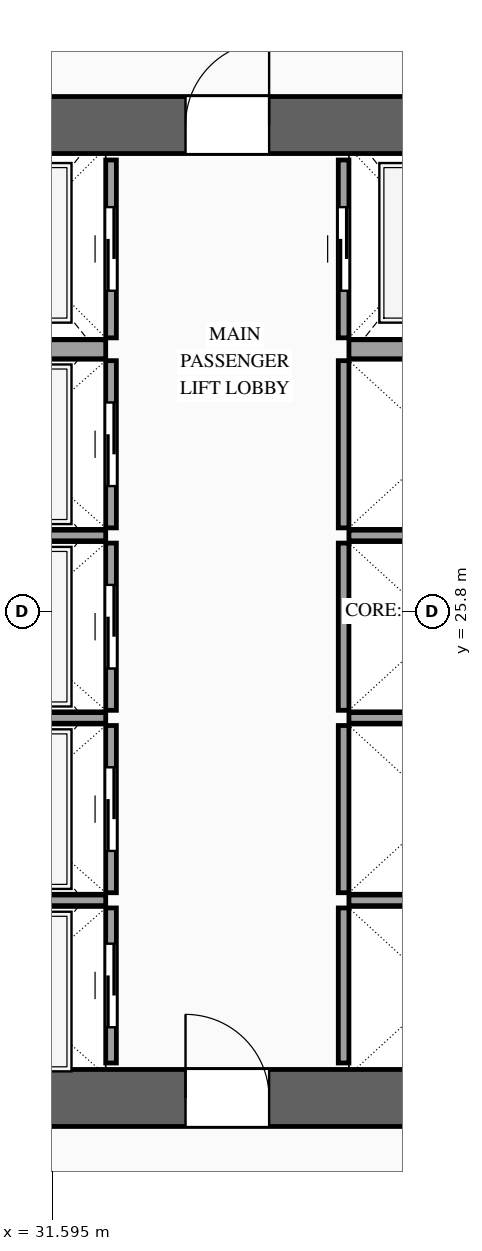
"""IFC4 building model, lengths in metres.
Left out: names, types, materials, properties, quantities, classifications, styles, units other than length and angle.
Written with IfcOpenShell. Run it as: python <this file> out.ifc"""

import sys

from ifc_helpers import new_model, si_unit, direction, frame, frame_2d, origin, place, context, subcontext, project, spatial, rectangle, extrude, source, transform, mapped, element, fill, save


model = new_model("IFC4")
c1 = context("Model", 3, precision=1e-05, world=origin(), true_north=direction((0.0, 1.0)))
c2 = subcontext(c1, "Body", "Model", "MODEL_VIEW")
j1 = project(units=[si_unit("LENGTHUNIT", "METRE"), si_unit("PLANEANGLEUNIT", "RADIAN")], contexts=[c1])
p1 = place(None, origin())
s1 = spatial("IfcSite", under=j1, at=p1, CompositionType="ELEMENT")
p2 = place(p1, origin())
s2 = spatial("IfcBuilding", under=s1, at=p2, CompositionType="ELEMENT")
p3 = place(p2, frame((0.0, 0.0, 148.8)))
s3 = spatial("IfcBuildingStorey", under=s2, at=p3, CompositionType="ELEMENT", Elevation=148.8)
p4 = place(p3, frame((23.425, 19.4, 0.0), z_axis=(0.0, 0.0, 1.0), x_axis=(1.0, 0.0, 0.0)))
e1 = element("IfcWall", 1, at=p4, inside=s3, PredefinedType="SHEAR", context=c2, shape_type="SweptSolid", body=[
    extrude(rectangle(XDim=27.15, YDim=0.75, at=frame_2d((13.575, 0.0))), origin(), (0.0, 0.0, 1.0), 3.6),
])
p5 = place(p4, frame((2.025, 0.0, 0.0)))
e2 = element("IfcOpeningElement", 2, at=p5, cuts=e1, PredefinedType="OPENING", context=c2, shape_type="SweptSolid", body=[
    extrude(rectangle(XDim=1.1, YDim=2.2, at=frame_2d((0.55, 1.1))), frame((0.0, 0.39, 0.0), z_axis=(0.0, -1.0, 0.0), x_axis=(1.0, 0.0, 0.0)), (0.0, 0.0, 1.0), 0.78),
])
p6 = place(p4, frame((9.925, 0.0, 0.0)))
e3 = element("IfcOpeningElement", 3, at=p6, cuts=e1, PredefinedType="OPENING", context=c2, shape_type="SweptSolid", body=[
    extrude(rectangle(XDim=1.1, YDim=2.2, at=frame_2d((0.55, 1.1))), frame((0.0, 0.39, 0.0), z_axis=(0.0, -1.0, 0.0), x_axis=(1.0, 0.0, 0.0)), (0.0, 0.0, 1.0), 0.78),
])
p7 = place(p4, frame((23.125, 0.0, 0.0)))
e4 = element("IfcOpeningElement", 4, at=p7, cuts=e1, PredefinedType="OPENING", context=c2, shape_type="SweptSolid", body=[
    extrude(rectangle(XDim=1.1, YDim=2.2, at=frame_2d((0.55, 1.1))), frame((0.0, 0.39, 0.0), z_axis=(0.0, -1.0, 0.0), x_axis=(1.0, 0.0, 0.0)), (0.0, 0.0, 1.0), 0.78),
])
p8 = place(p4, frame((19.745, 0.0, 0.0)))
e5 = element("IfcOpeningElement", 5, at=p8, cuts=e1, PredefinedType="OPENING", context=c2, shape_type="SweptSolid", body=[
    extrude(rectangle(XDim=0.9, YDim=2.15, at=frame_2d((0.45, 1.075))), frame((0.0, 0.39, 0.0), z_axis=(0.0, -1.0, 0.0), x_axis=(1.0, 0.0, 0.0)), (0.0, 0.0, 1.0), 0.78),
])
p9 = place(p4, frame((18.305, 0.0, 0.0)))
e6 = element("IfcOpeningElement", 6, at=p9, cuts=e1, PredefinedType="OPENING", context=c2, shape_type="SweptSolid", body=[
    extrude(rectangle(XDim=0.9, YDim=2.15, at=frame_2d((0.45, 1.075))), frame((0.0, 0.39, 0.0), z_axis=(0.0, -1.0, 0.0), x_axis=(1.0, 0.0, 0.0)), (0.0, 0.0, 1.0), 0.78),
])
p10 = place(p3, frame((23.425, 32.2, 0.0), z_axis=(0.0, 0.0, 1.0), x_axis=(1.0, 0.0, 0.0)))
e7 = element("IfcWall", 7, at=p10, inside=s3, PredefinedType="SHEAR", context=c2, shape_type="SweptSolid", body=[
    extrude(rectangle(XDim=27.15, YDim=0.75, at=frame_2d((13.575, 0.0))), origin(), (0.0, 0.0, 1.0), 3.6),
])
p11 = place(p10, frame((4.645, 0.0, 0.0)))
e8 = element("IfcOpeningElement", 8, at=p11, cuts=e7, PredefinedType="OPENING", context=c2, shape_type="SweptSolid", body=[
    extrude(rectangle(XDim=0.9, YDim=2.15, at=frame_2d((0.45, 1.075))), frame((0.0, 0.39, 0.0), z_axis=(0.0, -1.0, 0.0), x_axis=(1.0, 0.0, 0.0)), (0.0, 0.0, 1.0), 0.78),
])
p12 = place(p10, frame((9.925, 0.0, 0.0)))
e9 = element("IfcOpeningElement", 9, at=p12, cuts=e7, PredefinedType="OPENING", context=c2, shape_type="SweptSolid", body=[
    extrude(rectangle(XDim=1.1, YDim=2.2, at=frame_2d((0.55, 1.1))), frame((0.0, 0.39, 0.0), z_axis=(0.0, -1.0, 0.0), x_axis=(1.0, 0.0, 0.0)), (0.0, 0.0, 1.0), 0.78),
])
p13 = place(p10, frame((15.775, 0.0, 0.0)))
e10 = element("IfcOpeningElement", 10, at=p13, cuts=e7, PredefinedType="OPENING", context=c2, shape_type="SweptSolid", body=[
    extrude(rectangle(XDim=1.1, YDim=2.2, at=frame_2d((0.55, 1.1))), frame((0.0, 0.39, 0.0), z_axis=(0.0, -1.0, 0.0), x_axis=(1.0, 0.0, 0.0)), (0.0, 0.0, 1.0), 0.78),
])
p14 = place(p10, frame((19.745, 0.0, 0.0)))
e11 = element("IfcOpeningElement", 11, at=p14, cuts=e7, PredefinedType="OPENING", context=c2, shape_type="SweptSolid", body=[
    extrude(rectangle(XDim=0.9, YDim=2.15, at=frame_2d((0.45, 1.075))), frame((0.0, 0.39, 0.0), z_axis=(0.0, -1.0, 0.0), x_axis=(1.0, 0.0, 0.0)), (0.0, 0.0, 1.0), 0.78),
])
p15 = place(p3, frame((32.37, 19.86, 0.0), z_axis=(0.0, 0.0, 1.0), x_axis=(0.0, 1.0, 0.0)))
e12 = element("IfcWall", 12, at=p15, inside=s3, PredefinedType="SOLIDWALL", context=c2, shape_type="SweptSolid", body=[
    extrude(rectangle(XDim=2.04, YDim=0.14, at=frame_2d((1.02, 0.0))), origin(), (0.0, 0.0, 1.0), 3.38),
])
p16 = place(p15, frame((0.47, 0.0, 0.0)))
e13 = element("IfcOpeningElement", 13, at=p16, cuts=e12, PredefinedType="OPENING", context=c2, shape_type="SweptSolid", body=[
    extrude(rectangle(XDim=1.1, YDim=2.2, at=frame_2d((0.55, 1.1))), frame((0.0, 0.085, 0.0), z_axis=(0.0, -1.0, 0.0), x_axis=(1.0, 0.0, 0.0)), (0.0, 0.0, 1.0), 0.17),
])
m1 = source(origin(), c2, "Body", "SweptSolid", [
    extrude(rectangle(XDim=2.5, YDim=0.14, at=frame_2d((1.25, 0.0))), origin(), (0.0, 0.0, 1.0), 3.38),
])
p17 = place(p3, frame((29.8, 22.0, 0.0), z_axis=(0.0, 0.0, 1.0), x_axis=(1.0, 0.0, 0.0)))
e14 = element("IfcWall", 14, at=p17, inside=s3, PredefinedType="SOLIDWALL", context=c2, shape_type="MappedRepresentation", body=[
    mapped(m1, transform((0.0, 0.0, 0.0), scale=1.0)),
])
p18 = place(p3, frame((32.37, 22.1, 0.0), z_axis=(0.0, 0.0, 1.0), x_axis=(0.0, 1.0, 0.0)))
e15 = element("IfcWall", 15, at=p18, inside=s3, PredefinedType="SOLIDWALL", context=c2, shape_type="SweptSolid", body=[
    extrude(rectangle(XDim=2.2, YDim=0.14, at=frame_2d((1.1, 0.0))), origin(), (0.0, 0.0, 1.0), 3.38),
])
p19 = place(p18, frame((0.55, 0.0, 0.0)))
e16 = element("IfcOpeningElement", 16, at=p19, cuts=e15, PredefinedType="OPENING", context=c2, shape_type="SweptSolid", body=[
    extrude(rectangle(XDim=1.1, YDim=2.2, at=frame_2d((0.55, 1.1))), frame((0.0, 0.085, 0.0), z_axis=(0.0, -1.0, 0.0), x_axis=(1.0, 0.0, 0.0)), (0.0, 0.0, 1.0), 0.17),
])
p20 = place(p3, frame((29.8, 24.4, 0.0), z_axis=(0.0, 0.0, 1.0), x_axis=(1.0, 0.0, 0.0)))
e17 = element("IfcWall", 17, at=p20, inside=s3, PredefinedType="SOLIDWALL", context=c2, shape_type="MappedRepresentation", body=[
    mapped(m1, transform((0.0, 0.0, 0.0), scale=1.0)),
])
p21 = place(p3, frame((32.37, 24.5, 0.0), z_axis=(0.0, 0.0, 1.0), x_axis=(0.0, 1.0, 0.0)))
e18 = element("IfcWall", 18, at=p21, inside=s3, PredefinedType="SOLIDWALL", context=c2, shape_type="SweptSolid", body=[
    extrude(rectangle(XDim=2.2, YDim=0.14, at=frame_2d((1.1, 0.0))), origin(), (0.0, 0.0, 1.0), 3.38),
])
p22 = place(p21, frame((0.55, 0.0, 0.0)))
e19 = element("IfcOpeningElement", 19, at=p22, cuts=e18, PredefinedType="OPENING", context=c2, shape_type="SweptSolid", body=[
    extrude(rectangle(XDim=1.1, YDim=2.2, at=frame_2d((0.55, 1.1))), frame((0.0, 0.085, 0.0), z_axis=(0.0, -1.0, 0.0), x_axis=(1.0, 0.0, 0.0)), (0.0, 0.0, 1.0), 0.17),
])
p23 = place(p3, frame((29.8, 26.8, 0.0), z_axis=(0.0, 0.0, 1.0), x_axis=(1.0, 0.0, 0.0)))
e20 = element("IfcWall", 20, at=p23, inside=s3, PredefinedType="SOLIDWALL", context=c2, shape_type="MappedRepresentation", body=[
    mapped(m1, transform((0.0, 0.0, 0.0), scale=1.0)),
])
p24 = place(p3, frame((32.37, 26.9, 0.0), z_axis=(0.0, 0.0, 1.0), x_axis=(0.0, 1.0, 0.0)))
e21 = element("IfcWall", 21, at=p24, inside=s3, PredefinedType="SOLIDWALL", context=c2, shape_type="SweptSolid", body=[
    extrude(rectangle(XDim=2.2, YDim=0.14, at=frame_2d((1.1, 0.0))), origin(), (0.0, 0.0, 1.0), 3.38),
])
p25 = place(p24, frame((0.55, 0.0, 0.0)))
e22 = element("IfcOpeningElement", 22, at=p25, cuts=e21, PredefinedType="OPENING", context=c2, shape_type="SweptSolid", body=[
    extrude(rectangle(XDim=1.1, YDim=2.2, at=frame_2d((0.55, 1.1))), frame((0.0, 0.085, 0.0), z_axis=(0.0, -1.0, 0.0), x_axis=(1.0, 0.0, 0.0)), (0.0, 0.0, 1.0), 0.17),
])
p26 = place(p3, frame((32.37, 29.4, 0.0), z_axis=(0.0, 0.0, 1.0), x_axis=(0.0, 1.0, 0.0)))
e23 = element("IfcWall", 23, at=p26, inside=s3, PredefinedType="SOLIDWALL", context=c2, shape_type="SweptSolid", body=[
    extrude(rectangle(XDim=2.34, YDim=0.14, at=frame_2d((1.17, 0.0))), origin(), (0.0, 0.0, 1.0), 3.38),
])
p27 = place(p26, frame((0.62, 0.0, 0.0)))
e24 = element("IfcOpeningElement", 24, at=p27, cuts=e23, PredefinedType="OPENING", context=c2, shape_type="SweptSolid", body=[
    extrude(rectangle(XDim=1.1, YDim=2.2, at=frame_2d((0.55, 1.1))), frame((0.0, 0.085, 0.0), z_axis=(0.0, -1.0, 0.0), x_axis=(1.0, 0.0, 0.0)), (0.0, 0.0, 1.0), 0.17),
])
m2 = source(origin(), c2, "Body", "SweptSolid", [
    extrude(rectangle(XDim=2.5, YDim=0.25, at=frame_2d((1.25, 0.0))), origin(), (0.0, 0.0, 1.0), 3.38),
])
p28 = place(p3, frame((29.8, 29.25, 0.0), z_axis=(0.0, 0.0, 1.0), x_axis=(1.0, 0.0, 0.0)))
e25 = element("IfcWall", 25, at=p28, inside=s3, PredefinedType="SOLIDWALL", context=c2, shape_type="MappedRepresentation", body=[
    mapped(m2, transform((0.0, 0.0, 0.0), scale=1.0)),
])
m3 = source(origin(), c2, "Body", "SweptSolid", [
    extrude(rectangle(XDim=2.04, YDim=0.14, at=frame_2d((1.02, 0.0))), origin(), (0.0, 0.0, 1.0), 3.38),
])
p29 = place(p3, frame((35.43, 19.86, 0.0), z_axis=(0.0, 0.0, 1.0), x_axis=(0.0, 1.0, 0.0)))
e26 = element("IfcWall", 26, at=p29, inside=s3, PredefinedType="SOLIDWALL", context=c2, shape_type="MappedRepresentation", body=[
    mapped(m3, transform((0.0, 0.0, 0.0), scale=1.0)),
])
m4 = source(origin(), c2, "Body", "SweptSolid", [
    extrude(rectangle(XDim=2.4, YDim=0.14, at=frame_2d((1.2, 0.0))), origin(), (0.0, 0.0, 1.0), 3.38),
])
p30 = place(p3, frame((35.5, 22.0, 0.0), z_axis=(0.0, 0.0, 1.0), x_axis=(1.0, 0.0, 0.0)))
e27 = element("IfcWall", 27, at=p30, inside=s3, PredefinedType="SOLIDWALL", context=c2, shape_type="MappedRepresentation", body=[
    mapped(m4, transform((0.0, 0.0, 0.0), scale=1.0)),
])
m5 = source(origin(), c2, "Body", "SweptSolid", [
    extrude(rectangle(XDim=2.2, YDim=0.14, at=frame_2d((1.1, 0.0))), origin(), (0.0, 0.0, 1.0), 3.38),
])
p31 = place(p3, frame((35.43, 22.1, 0.0), z_axis=(0.0, 0.0, 1.0), x_axis=(0.0, 1.0, 0.0)))
e28 = element("IfcWall", 28, at=p31, inside=s3, PredefinedType="SOLIDWALL", context=c2, shape_type="MappedRepresentation", body=[
    mapped(m5, transform((0.0, 0.0, 0.0), scale=1.0)),
])
p32 = place(p3, frame((35.5, 24.4, 0.0), z_axis=(0.0, 0.0, 1.0), x_axis=(1.0, 0.0, 0.0)))
e29 = element("IfcWall", 29, at=p32, inside=s3, PredefinedType="SOLIDWALL", context=c2, shape_type="MappedRepresentation", body=[
    mapped(m4, transform((0.0, 0.0, 0.0), scale=1.0)),
])
p33 = place(p3, frame((35.43, 24.5, 0.0), z_axis=(0.0, 0.0, 1.0), x_axis=(0.0, 1.0, 0.0)))
e30 = element("IfcWall", 30, at=p33, inside=s3, PredefinedType="SOLIDWALL", context=c2, shape_type="MappedRepresentation", body=[
    mapped(m5, transform((0.0, 0.0, 0.0), scale=1.0)),
])
p34 = place(p3, frame((35.5, 26.8, 0.0), z_axis=(0.0, 0.0, 1.0), x_axis=(1.0, 0.0, 0.0)))
e31 = element("IfcWall", 31, at=p34, inside=s3, PredefinedType="SOLIDWALL", context=c2, shape_type="MappedRepresentation", body=[
    mapped(m4, transform((0.0, 0.0, 0.0), scale=1.0)),
])
m6 = source(origin(), c2, "Body", "SweptSolid", [
    extrude(rectangle(XDim=2.2, YDim=0.14, at=frame_2d((1.1, 0.0))), origin(), (0.0, 0.0, 1.0), 3.38),
])
p35 = place(p3, frame((35.43, 26.9, 0.0), z_axis=(0.0, 0.0, 1.0), x_axis=(0.0, 1.0, 0.0)))
e32 = element("IfcWall", 32, at=p35, inside=s3, PredefinedType="SOLIDWALL", context=c2, shape_type="MappedRepresentation", body=[
    mapped(m6, transform((0.0, 0.0, 0.0), scale=1.0)),
])
p36 = place(p3, frame((35.43, 29.4, 0.0), z_axis=(0.0, 0.0, 1.0), x_axis=(0.0, 1.0, 0.0)))
e33 = element("IfcWall", 33, at=p36, inside=s3, PredefinedType="SOLIDWALL", context=c2, shape_type="SweptSolid", body=[
    extrude(rectangle(XDim=2.34, YDim=0.14, at=frame_2d((1.17, 0.0))), origin(), (0.0, 0.0, 1.0), 3.38),
])
p37 = place(p36, frame((0.62, 0.0, 0.0)))
e34 = element("IfcOpeningElement", 34, at=p37, cuts=e33, PredefinedType="OPENING", context=c2, shape_type="SweptSolid", body=[
    extrude(rectangle(XDim=1.1, YDim=2.2, at=frame_2d((0.55, 1.1))), frame((0.0, 0.085, 0.0), z_axis=(0.0, -1.0, 0.0), x_axis=(1.0, 0.0, 0.0)), (0.0, 0.0, 1.0), 0.17),
])
m7 = source(origin(), c2, "Body", "SweptSolid", [
    extrude(rectangle(XDim=2.4, YDim=0.25, at=frame_2d((1.2, 0.0))), origin(), (0.0, 0.0, 1.0), 3.38),
])
p38 = place(p3, frame((35.5, 29.25, 0.0), z_axis=(0.0, 0.0, 1.0), x_axis=(1.0, 0.0, 0.0)))
e35 = element("IfcWall", 35, at=p38, inside=s3, PredefinedType="SOLIDWALL", context=c2, shape_type="MappedRepresentation", body=[
    mapped(m7, transform((0.0, 0.0, 0.0), scale=1.0)),
])
m8 = source(origin(), c2, "Body", "SweptSolid", [
    extrude(rectangle(XDim=1.1, YDim=2.2, at=frame_2d((0.55, 1.1))), frame((0.0, 0.025, 0.0), z_axis=(0.0, -1.0, 0.0), x_axis=(1.0, 0.0, 0.0)), (0.0, 0.0, 1.0), 0.05),
])
p39 = place(p16, origin())
e36 = element("IfcDoor", 36, at=p39, inside=s3, OperationType="SLIDING_TO_LEFT", PredefinedType="DOOR", context=c2, shape_type="MappedRepresentation", body=[
    mapped(m8, transform((0.0, 0.0, 0.0), scale=1.0)),
])
fill(e13, e36)
p40 = place(p19, origin())
e37 = element("IfcDoor", 37, at=p40, inside=s3, OperationType="SLIDING_TO_RIGHT", PredefinedType="DOOR", context=c2, shape_type="MappedRepresentation", body=[
    mapped(m8, transform((0.0, 0.0, 0.0), scale=1.0)),
])
fill(e16, e37)
p41 = place(p22, origin())
e38 = element("IfcDoor", 38, at=p41, inside=s3, OperationType="SLIDING_TO_LEFT", PredefinedType="DOOR", context=c2, shape_type="MappedRepresentation", body=[
    mapped(m8, transform((0.0, 0.0, 0.0), scale=1.0)),
])
fill(e19, e38)
p42 = place(p25, origin())
e39 = element("IfcDoor", 39, at=p42, inside=s3, OperationType="SLIDING_TO_RIGHT", PredefinedType="DOOR", context=c2, shape_type="MappedRepresentation", body=[
    mapped(m8, transform((0.0, 0.0, 0.0), scale=1.0)),
])
fill(e22, e39)
p43 = place(p27, origin())
e40 = element("IfcDoor", 40, at=p43, inside=s3, OperationType="SLIDING_TO_LEFT", PredefinedType="DOOR", context=c2, shape_type="MappedRepresentation", body=[
    mapped(m8, transform((0.0, 0.0, 0.0), scale=1.0)),
])
fill(e24, e40)
p44 = place(p37, origin())
e41 = element("IfcDoor", 41, at=p44, inside=s3, OperationType="SLIDING_TO_RIGHT", PredefinedType="DOOR", context=c2, shape_type="MappedRepresentation", body=[
    mapped(m8, transform((0.0, 0.0, 0.0), scale=1.0)),
])
fill(e34, e41)
m9 = source(origin(), c2, "Body", "SweptSolid", [
    extrude(rectangle(XDim=1.1, YDim=2.2, at=frame_2d((0.55, 1.1))), frame((0.0, 0.025, 0.0), z_axis=(0.0, -1.0, 0.0), x_axis=(1.0, 0.0, 0.0)), (0.0, 0.0, 1.0), 0.05),
])
p45 = place(p6, origin())
e42 = element("IfcDoor", 42, at=p45, inside=s3, OperationType="SINGLE_SWING_LEFT", PredefinedType="DOOR", context=c2, shape_type="MappedRepresentation", body=[
    mapped(m9, transform((0.0, 0.0, 0.0), scale=1.0)),
])
fill(e3, e42)
p46 = place(p12, origin())
e43 = element("IfcDoor", 43, at=p46, inside=s3, OperationType="SINGLE_SWING_RIGHT", PredefinedType="DOOR", context=c2, shape_type="MappedRepresentation", body=[
    mapped(m9, transform((0.0, 0.0, 0.0), scale=1.0)),
])
fill(e9, e43)
save(model, sys.argv[1])
